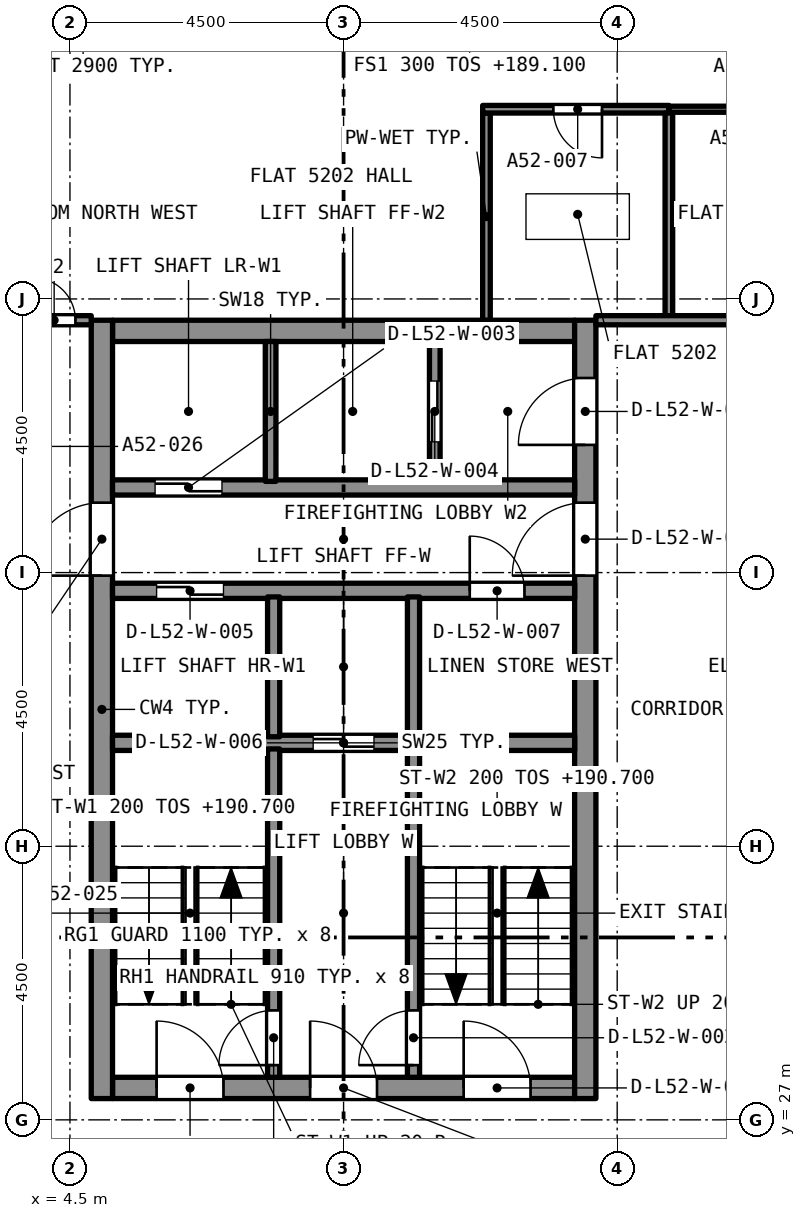
"""IFC4 building model, lengths in metres.
Left out: names, types, materials, properties, quantities, classifications, styles, units other than length and angle.
Written with IfcOpenShell. Run it as: python <this file> out.ifc"""

import sys

from ifc_helpers import new_model, si_unit, direction, frame, frame_2d, origin, place, context, subcontext, project, spatial, rectangle, extrude, element, fill, save


model = new_model("IFC4")
c1 = context("Model", 3, precision=1e-05, world=origin(), true_north=direction((0.0, 1.0)))
c2 = subcontext(c1, "Body", "Model", "MODEL_VIEW")
j1 = project(units=[si_unit("LENGTHUNIT", "METRE"), si_unit("PLANEANGLEUNIT", "RADIAN")], contexts=[c1])
p1 = place(None, origin())
s1 = spatial("IfcSite", under=j1, at=p1, CompositionType="ELEMENT")
p2 = place(p1, origin())
s2 = spatial("IfcBuilding", under=s1, at=p2, CompositionType="ELEMENT")
p3 = place(p2, frame((0.0, 0.0, 189.1)))
s3 = spatial("IfcBuildingStorey", under=s2, at=p3, CompositionType="ELEMENT", Elevation=189.1)
p4 = place(p3, frame((5.2, 27.525, 0.0), z_axis=(0.0, 0.0, 1.0), x_axis=(1.0, 0.0, 0.0)))
e1 = element("IfcWall", 1, at=p4, inside=s3, PredefinedType="SOLIDWALL", context=c2, shape_type="SweptSolid", body=[
    extrude(rectangle(XDim=7.6, YDim=0.35, at=frame_2d((3.8, 0.0))), origin(), (0.0, 0.0, 1.0), 3.2),
])
p5 = place(p4, frame((0.725, 0.0, 0.0)))
e2 = element("IfcOpeningElement", 2, at=p5, cuts=e1, PredefinedType="OPENING", context=c2, shape_type="SweptSolid", body=[
    extrude(rectangle(XDim=1.1, YDim=2.1, at=frame_2d((0.55, 1.05))), frame((0.0, 0.185, 0.0), z_axis=(0.0, -1.0, 0.0), x_axis=(1.0, 0.0, 0.0)), (0.0, 0.0, 1.0), 0.37),
])
p6 = place(p4, frame((3.25, 0.0, 0.0)))
e3 = element("IfcOpeningElement", 3, at=p6, cuts=e1, PredefinedType="OPENING", context=c2, shape_type="SweptSolid", body=[
    extrude(rectangle(XDim=1.1, YDim=2.1, at=frame_2d((0.55, 1.05))), frame((0.0, 0.185, 0.0), z_axis=(0.0, -1.0, 0.0), x_axis=(1.0, 0.0, 0.0)), (0.0, 0.0, 1.0), 0.37),
])
p7 = place(p4, frame((5.775, 0.0, 0.0)))
e4 = element("IfcOpeningElement", 4, at=p7, cuts=e1, PredefinedType="OPENING", context=c2, shape_type="SweptSolid", body=[
    extrude(rectangle(XDim=1.1, YDim=2.1, at=frame_2d((0.55, 1.05))), frame((0.0, 0.185, 0.0), z_axis=(0.0, -1.0, 0.0), x_axis=(1.0, 0.0, 0.0)), (0.0, 0.0, 1.0), 0.37),
])
p8 = place(p3, frame((5.2, 39.975, 0.0), z_axis=(0.0, 0.0, 1.0), x_axis=(1.0, 0.0, 0.0)))
e5 = element("IfcWall", 5, at=p8, inside=s3, PredefinedType="SOLIDWALL", context=c2, shape_type="SweptSolid", body=[
    extrude(rectangle(XDim=7.6, YDim=0.35, at=frame_2d((3.8, 0.0))), origin(), (0.0, 0.0, 1.0), 3.2),
])
p9 = place(p3, frame((5.025, 27.35, 0.0), z_axis=(0.0, 0.0, 1.0), x_axis=(0.0, 1.0, 0.0)))
e6 = element("IfcWall", 6, at=p9, inside=s3, PredefinedType="SOLIDWALL", context=c2, shape_type="SweptSolid", body=[
    extrude(rectangle(XDim=12.8, YDim=0.35, at=frame_2d((6.4, 0.0))), origin(), (0.0, 0.0, 1.0), 3.2),
])
p10 = place(p9, frame((8.6, 0.0, 0.0)))
e7 = element("IfcOpeningElement", 7, at=p10, cuts=e6, PredefinedType="OPENING", context=c2, shape_type="SweptSolid", body=[
    extrude(rectangle(XDim=1.2, YDim=2.1, at=frame_2d((0.6, 1.05))), frame((0.0, 0.185, 0.0), z_axis=(0.0, -1.0, 0.0), x_axis=(1.0, 0.0, 0.0)), (0.0, 0.0, 1.0), 0.37),
])
p11 = place(p3, frame((12.975, 27.35, 0.0), z_axis=(0.0, 0.0, 1.0), x_axis=(0.0, 1.0, 0.0)))
e8 = element("IfcWall", 8, at=p11, inside=s3, PredefinedType="SOLIDWALL", context=c2, shape_type="SweptSolid", body=[
    extrude(rectangle(XDim=12.8, YDim=0.35, at=frame_2d((6.4, 0.0))), origin(), (0.0, 0.0, 1.0), 3.2),
])
p12 = place(p11, frame((10.75, 0.0, 0.0)))
e9 = element("IfcOpeningElement", 9, at=p12, cuts=e8, PredefinedType="OPENING", context=c2, shape_type="SweptSolid", body=[
    extrude(rectangle(XDim=1.1, YDim=2.1, at=frame_2d((0.55, 1.05))), frame((0.0, 0.185, 0.0), z_axis=(0.0, -1.0, 0.0), x_axis=(1.0, 0.0, 0.0)), (0.0, 0.0, 1.0), 0.37),
])
p13 = place(p11, frame((8.6, 0.0, 0.0)))
e10 = element("IfcOpeningElement", 10, at=p13, cuts=e8, PredefinedType="OPENING", context=c2, shape_type="SweptSolid", body=[
    extrude(rectangle(XDim=1.2, YDim=2.1, at=frame_2d((0.6, 1.05))), frame((0.0, 0.185, 0.0), z_axis=(0.0, -1.0, 0.0), x_axis=(1.0, 0.0, 0.0)), (0.0, 0.0, 1.0), 0.37),
])
p14 = place(p3, frame((11.35, 40.15, 0.0), z_axis=(0.0, 0.0, 1.0), x_axis=(0.0, 1.0, 0.0)))
e11 = element("IfcWall", 11, at=p14, inside=s3, PredefinedType="PARTITIONING", context=c2, shape_type="SweptSolid", body=[
    extrude(rectangle(XDim=3.408, YDim=0.125, at=frame_2d((1.704, 0.0))), origin(), (0.0, 0.0, 1.0), 2.9),
])
p15 = place(p3, frame((14.35, 43.62, 0.0), z_axis=(0.0, 0.0, 1.0), x_axis=(-1.0, 0.0, 0.0)))
e12 = element("IfcWall", 12, at=p15, inside=s3, PredefinedType="PARTITIONING", context=c2, shape_type="SweptSolid", body=[
    extrude(rectangle(XDim=3.063, YDim=0.125, at=frame_2d((1.531, 0.0))), origin(), (0.0, 0.0, 1.0), 2.9),
])
p16 = place(p15, frame((1.1, 0.0, 0.0)))
e13 = element("IfcOpeningElement", 13, at=p16, cuts=e12, PredefinedType="OPENING", context=c2, shape_type="SweptSolid", body=[
    extrude(rectangle(XDim=0.8, YDim=2.1, at=frame_2d((0.4, 1.05))), frame((0.0, 0.073, 0.0), z_axis=(0.0, -1.0, 0.0), x_axis=(1.0, 0.0, 0.0)), (0.0, 0.0, 1.0), 0.145),
])
p17 = place(p3, frame((14.35, 40.225, 0.0), z_axis=(0.0, 0.0, 1.0), x_axis=(0.0, 1.0, 0.0)))
e14 = element("IfcWall", 14, at=p17, inside=s3, PredefinedType="PARTITIONING", context=c2, shape_type="SweptSolid", body=[
    extrude(rectangle(XDim=3.333, YDim=0.125, at=frame_2d((1.666, 0.0))), origin(), (0.0, 0.0, 1.0), 2.9),
])
p18 = place(p3, frame((13.15, 40.15, 0.0), z_axis=(0.0, 0.0, 1.0), x_axis=(1.0, 0.0, 0.0)))
e15 = element("IfcWall", 15, at=p18, inside=s3, PredefinedType="PARTITIONING", context=c2, shape_type="SweptSolid", body=[
    extrude(rectangle(XDim=4.45, YDim=0.15, at=frame_2d((2.225, 0.0))), origin(), (0.0, 0.0, 1.0), 2.9),
])
p19 = place(p3, frame((17.875, 43.62, 0.0), z_axis=(0.0, 0.0, 1.0), x_axis=(-1.0, 0.0, 0.0)))
e16 = element("IfcWall", 16, at=p19, inside=s3, PredefinedType="PARTITIONING", context=c2, shape_type="SweptSolid", body=[
    extrude(rectangle(XDim=3.525, YDim=0.1, at=frame_2d((1.762, 0.0))), origin(), (0.0, 0.0, 1.0), 2.9),
])
p20 = place(p19, frame((1.25, 0.0, 0.0)))
e17 = element("IfcOpeningElement", 17, at=p20, cuts=e16, PredefinedType="OPENING", context=c2, shape_type="SweptSolid", body=[
    extrude(rectangle(XDim=0.9, YDim=2.1, at=frame_2d((0.45, 1.05))), frame((0.0, 0.06, 0.0), z_axis=(0.0, -1.0, 0.0), x_axis=(1.0, 0.0, 0.0)), (0.0, 0.0, 1.0), 0.12),
])
p21 = place(p3, frame((3.65, 40.15, 0.0), z_axis=(0.0, 0.0, 1.0), x_axis=(1.0, 0.0, 0.0)))
e18 = element("IfcWall", 18, at=p21, inside=s3, PredefinedType="PARTITIONING", context=c2, shape_type="SweptSolid", body=[
    extrude(rectangle(XDim=1.2, YDim=0.15, at=frame_2d((0.6, 0.0))), origin(), (0.0, 0.0, 1.0), 2.9),
])
p22 = place(p21, frame((0.24, 0.0, 0.0)))
e19 = element("IfcOpeningElement", 19, at=p22, cuts=e18, PredefinedType="OPENING", context=c2, shape_type="SweptSolid", body=[
    extrude(rectangle(XDim=0.7, YDim=2.1, at=frame_2d((0.35, 1.05))), frame((0.0, 0.085, 0.0), z_axis=(0.0, -1.0, 0.0), x_axis=(1.0, 0.0, 0.0)), (0.0, 0.0, 1.0), 0.17),
])
p23 = place(p3, frame((5.2, 33.2, 0.0), z_axis=(0.0, 0.0, 1.0), x_axis=(1.0, 0.0, 0.0)))
e20 = element("IfcWall", 20, at=p23, inside=s3, PredefinedType="SOLIDWALL", context=c2, shape_type="SweptSolid", body=[
    extrude(rectangle(XDim=7.6, YDim=0.25, at=frame_2d((3.8, 0.0))), origin(), (0.0, 0.0, 1.0), 2.9),
])
p24 = place(p23, frame((3.3, 0.0, 0.0)))
e21 = element("IfcOpeningElement", 21, at=p24, cuts=e20, PredefinedType="OPENING", context=c2, shape_type="SweptSolid", body=[
    extrude(rectangle(XDim=1.0, YDim=2.1, at=frame_2d((0.5, 1.05))), frame((0.0, 0.135, 0.0), z_axis=(0.0, -1.0, 0.0), x_axis=(1.0, 0.0, 0.0)), (0.0, 0.0, 1.0), 0.27),
])
p25 = place(p3, frame((5.2, 35.7, 0.0), z_axis=(0.0, 0.0, 1.0), x_axis=(1.0, 0.0, 0.0)))
e22 = element("IfcWall", 22, at=p25, inside=s3, PredefinedType="SOLIDWALL", context=c2, shape_type="SweptSolid", body=[
    extrude(rectangle(XDim=7.6, YDim=0.25, at=frame_2d((3.8, 0.0))), origin(), (0.0, 0.0, 1.0), 2.9),
])
p26 = place(p25, frame((0.725, 0.0, 0.0)))
e23 = element("IfcOpeningElement", 23, at=p26, cuts=e22, PredefinedType="OPENING", context=c2, shape_type="SweptSolid", body=[
    extrude(rectangle(XDim=1.1, YDim=2.4, at=frame_2d((0.55, 1.2))), frame((0.0, 0.135, 0.0), z_axis=(0.0, -1.0, 0.0), x_axis=(1.0, 0.0, 0.0)), (0.0, 0.0, 1.0), 0.27),
])
p27 = place(p25, frame((5.875, 0.0, 0.0)))
e24 = element("IfcOpeningElement", 24, at=p27, cuts=e22, PredefinedType="OPENING", context=c2, shape_type="SweptSolid", body=[
    extrude(rectangle(XDim=0.9, YDim=2.1, at=frame_2d((0.45, 1.05))), frame((0.0, 0.135, 0.0), z_axis=(0.0, -1.0, 0.0), x_axis=(1.0, 0.0, 0.0)), (0.0, 0.0, 1.0), 0.27),
])
p28 = place(p3, frame((5.2, 37.4, 0.0), z_axis=(0.0, 0.0, 1.0), x_axis=(1.0, 0.0, 0.0)))
e25 = element("IfcWall", 25, at=p28, inside=s3, PredefinedType="SOLIDWALL", context=c2, shape_type="SweptSolid", body=[
    extrude(rectangle(XDim=7.6, YDim=0.25, at=frame_2d((3.8, 0.0))), origin(), (0.0, 0.0, 1.0), 2.9),
])
p29 = place(p28, frame((0.7, 0.0, 0.0)))
e26 = element("IfcOpeningElement", 26, at=p29, cuts=e25, PredefinedType="OPENING", context=c2, shape_type="SweptSolid", body=[
    extrude(rectangle(XDim=1.1, YDim=2.4, at=frame_2d((0.55, 1.2))), frame((0.0, 0.135, 0.0), z_axis=(0.0, -1.0, 0.0), x_axis=(1.0, 0.0, 0.0)), (0.0, 0.0, 1.0), 0.27),
])
p30 = place(p3, frame((7.85, 27.7, 0.0), z_axis=(0.0, 0.0, 1.0), x_axis=(0.0, 1.0, 0.0)))
e27 = element("IfcWall", 27, at=p30, inside=s3, PredefinedType="SOLIDWALL", context=c2, shape_type="SweptSolid", body=[
    extrude(rectangle(XDim=5.4, YDim=0.2, at=frame_2d((2.7, 0.0))), origin(), (0.0, 0.0, 1.0), 2.9),
])
p31 = place(p30, frame((0.2, 0.0, 0.0)))
e28 = element("IfcOpeningElement", 28, at=p31, cuts=e27, PredefinedType="OPENING", context=c2, shape_type="SweptSolid", body=[
    extrude(rectangle(XDim=0.9, YDim=2.1, at=frame_2d((0.45, 1.05))), frame((0.0, 0.11, 0.0), z_axis=(0.0, -1.0, 0.0), x_axis=(1.0, 0.0, 0.0)), (0.0, 0.0, 1.0), 0.22),
])
p32 = place(p3, frame((10.15, 27.7, 0.0), z_axis=(0.0, 0.0, 1.0), x_axis=(0.0, 1.0, 0.0)))
e29 = element("IfcWall", 29, at=p32, inside=s3, PredefinedType="SOLIDWALL", context=c2, shape_type="SweptSolid", body=[
    extrude(rectangle(XDim=5.4, YDim=0.2, at=frame_2d((2.7, 0.0))), origin(), (0.0, 0.0, 1.0), 2.9),
])
p33 = place(p32, frame((0.2, 0.0, 0.0)))
e30 = element("IfcOpeningElement", 30, at=p33, cuts=e29, PredefinedType="OPENING", context=c2, shape_type="SweptSolid", body=[
    extrude(rectangle(XDim=0.9, YDim=2.1, at=frame_2d((0.45, 1.05))), frame((0.0, 0.11, 0.0), z_axis=(0.0, -1.0, 0.0), x_axis=(1.0, 0.0, 0.0)), (0.0, 0.0, 1.0), 0.22),
])
for number, where, z_axis, x_axis in (
    (31, (7.85, 33.3, 0.0), (0.0, 0.0, 1.0), (0.0, 1.0, 0.0)),
    (32, (10.15, 33.3, 0.0), (0.0, 0.0, 1.0), (0.0, 1.0, 0.0)),
):
    element("IfcWall", number, at=place(p3, frame(where, z_axis=z_axis, x_axis=x_axis)), inside=s3, PredefinedType="SOLIDWALL", context=c2, shape_type="SweptSolid", body=[
        extrude(rectangle(XDim=2.3, YDim=0.2, at=frame_2d((1.15, 0.0))), origin(), (0.0, 0.0, 1.0), 2.9),
    ])
p34 = place(p3, frame((7.8, 37.5, 0.0), z_axis=(0.0, 0.0, 1.0), x_axis=(0.0, 1.0, 0.0)))
e33 = element("IfcWall", 33, at=p34, inside=s3, PredefinedType="SOLIDWALL", context=c2, shape_type="SweptSolid", body=[
    extrude(rectangle(XDim=2.3, YDim=0.175, at=frame_2d((1.15, 0.0))), origin(), (0.0, 0.0, 1.0), 2.9),
])
p35 = place(p3, frame((10.5, 37.5, 0.0), z_axis=(0.0, 0.0, 1.0), x_axis=(0.0, 1.0, 0.0)))
e34 = element("IfcWall", 34, at=p35, inside=s3, PredefinedType="SOLIDWALL", context=c2, shape_type="SweptSolid", body=[
    extrude(rectangle(XDim=2.3, YDim=0.175, at=frame_2d((1.15, 0.0))), origin(), (0.0, 0.0, 1.0), 2.9),
])
p36 = place(p35, frame((0.65, 0.0, 0.0)))
e35 = element("IfcOpeningElement", 35, at=p36, cuts=e34, PredefinedType="OPENING", context=c2, shape_type="SweptSolid", body=[
    extrude(rectangle(XDim=1.0, YDim=2.1, at=frame_2d((0.5, 1.05))), frame((0.0, 0.097, 0.0), z_axis=(0.0, -1.0, 0.0), x_axis=(1.0, 0.0, 0.0)), (0.0, 0.0, 1.0), 0.195),
])
p37 = place(p16, origin())
e36 = element("IfcDoor", 36, at=p37, inside=s3, OperationType="SINGLE_SWING_LEFT", PredefinedType="DOOR", context=c2, shape_type="SweptSolid", body=[
    extrude(rectangle(XDim=0.8, YDim=2.1, at=frame_2d((0.4, 1.05))), frame((0.0, 0.025, 0.0), z_axis=(0.0, -1.0, 0.0), x_axis=(1.0, 0.0, 0.0)), (0.0, 0.0, 1.0), 0.05),
])
fill(e13, e36)
p38 = place(p22, origin())
e37 = element("IfcDoor", 37, at=p38, inside=s3, OperationType="SINGLE_SWING_LEFT", PredefinedType="DOOR", context=c2, shape_type="SweptSolid", body=[
    extrude(rectangle(XDim=0.7, YDim=2.1, at=frame_2d((0.35, 1.05))), frame((0.0, 0.025, 0.0), z_axis=(0.0, -1.0, 0.0), x_axis=(1.0, 0.0, 0.0)), (0.0, 0.0, 1.0), 0.05),
])
fill(e19, e37)
p39 = place(p31, origin())
e38 = element("IfcDoor", 38, at=p39, inside=s3, OperationType="SINGLE_SWING_LEFT", PredefinedType="DOOR", context=c2, shape_type="SweptSolid", body=[
    extrude(rectangle(XDim=0.9, YDim=2.1, at=frame_2d((0.45, 1.05))), frame((0.0, 0.025, 0.0), z_axis=(0.0, -1.0, 0.0), x_axis=(1.0, 0.0, 0.0)), (0.0, 0.0, 1.0), 0.05),
])
fill(e28, e38)
p40 = place(p33, origin())
e39 = element("IfcDoor", 39, at=p40, inside=s3, OperationType="SINGLE_SWING_LEFT", PredefinedType="DOOR", context=c2, shape_type="SweptSolid", body=[
    extrude(rectangle(XDim=0.9, YDim=2.1, at=frame_2d((0.45, 1.05))), frame((0.0, 0.025, 0.0), z_axis=(0.0, -1.0, 0.0), x_axis=(1.0, 0.0, 0.0)), (0.0, 0.0, 1.0), 0.05),
])
fill(e30, e39)
p41 = place(p29, origin())
e40 = element("IfcDoor", 40, at=p41, inside=s3, OperationType="SLIDING_TO_LEFT", PredefinedType="DOOR", context=c2, shape_type="SweptSolid", body=[
    extrude(rectangle(XDim=1.1, YDim=2.4, at=frame_2d((0.55, 1.2))), frame((0.0, 0.025, 0.0), z_axis=(0.0, -1.0, 0.0), x_axis=(1.0, 0.0, 0.0)), (0.0, 0.0, 1.0), 0.05),
])
fill(e26, e40)
p42 = place(p36, origin())
e41 = element("IfcDoor", 41, at=p42, inside=s3, OperationType="SLIDING_TO_LEFT", PredefinedType="DOOR", context=c2, shape_type="SweptSolid", body=[
    extrude(rectangle(XDim=1.0, YDim=2.1, at=frame_2d((0.5, 1.05))), frame((0.0, 0.025, 0.0), z_axis=(0.0, -1.0, 0.0), x_axis=(1.0, 0.0, 0.0)), (0.0, 0.0, 1.0), 0.05),
])
fill(e35, e41)
p43 = place(p26, origin())
e42 = element("IfcDoor", 42, at=p43, inside=s3, OperationType="SLIDING_TO_LEFT", PredefinedType="DOOR", context=c2, shape_type="SweptSolid", body=[
    extrude(rectangle(XDim=1.1, YDim=2.4, at=frame_2d((0.55, 1.2))), frame((0.0, 0.025, 0.0), z_axis=(0.0, -1.0, 0.0), x_axis=(1.0, 0.0, 0.0)), (0.0, 0.0, 1.0), 0.05),
])
fill(e23, e42)
p44 = place(p24, origin())
e43 = element("IfcDoor", 43, at=p44, inside=s3, OperationType="SLIDING_TO_LEFT", PredefinedType="DOOR", context=c2, shape_type="SweptSolid", body=[
    extrude(rectangle(XDim=1.0, YDim=2.1, at=frame_2d((0.5, 1.05))), frame((0.0, 0.025, 0.0), z_axis=(0.0, -1.0, 0.0), x_axis=(1.0, 0.0, 0.0)), (0.0, 0.0, 1.0), 0.05),
])
fill(e21, e43)
p45 = place(p27, origin())
e44 = element("IfcDoor", 44, at=p45, inside=s3, OperationType="SINGLE_SWING_LEFT", PredefinedType="DOOR", context=c2, shape_type="SweptSolid", body=[
    extrude(rectangle(XDim=0.9, YDim=2.1, at=frame_2d((0.45, 1.05))), frame((0.0, 0.025, 0.0), z_axis=(0.0, -1.0, 0.0), x_axis=(1.0, 0.0, 0.0)), (0.0, 0.0, 1.0), 0.05),
])
fill(e24, e44)
p46 = place(p5, origin())
e45 = element("IfcDoor", 45, at=p46, inside=s3, OperationType="SINGLE_SWING_LEFT", PredefinedType="DOOR", context=c2, shape_type="SweptSolid", body=[
    extrude(rectangle(XDim=1.1, YDim=2.1, at=frame_2d((0.55, 1.05))), frame((0.0, 0.025, 0.0), z_axis=(0.0, -1.0, 0.0), x_axis=(1.0, 0.0, 0.0)), (0.0, 0.0, 1.0), 0.05),
])
fill(e2, e45)
p47 = place(p6, origin())
e46 = element("IfcDoor", 46, at=p47, inside=s3, OperationType="SINGLE_SWING_LEFT", PredefinedType="DOOR", context=c2, shape_type="SweptSolid", body=[
    extrude(rectangle(XDim=1.1, YDim=2.1, at=frame_2d((0.55, 1.05))), frame((0.0, 0.025, 0.0), z_axis=(0.0, -1.0, 0.0), x_axis=(1.0, 0.0, 0.0)), (0.0, 0.0, 1.0), 0.05),
])
fill(e3, e46)
p48 = place(p7, origin())
e47 = element("IfcDoor", 47, at=p48, inside=s3, OperationType="SINGLE_SWING_LEFT", PredefinedType="DOOR", context=c2, shape_type="SweptSolid", body=[
    extrude(rectangle(XDim=1.1, YDim=2.1, at=frame_2d((0.55, 1.05))), frame((0.0, 0.025, 0.0), z_axis=(0.0, -1.0, 0.0), x_axis=(1.0, 0.0, 0.0)), (0.0, 0.0, 1.0), 0.05),
])
fill(e4, e47)
p49 = place(p12, origin())
e48 = element("IfcDoor", 48, at=p49, inside=s3, OperationType="SINGLE_SWING_LEFT", PredefinedType="DOOR", context=c2, shape_type="SweptSolid", body=[
    extrude(rectangle(XDim=1.1, YDim=2.1, at=frame_2d((0.55, 1.05))), frame((0.0, 0.025, 0.0), z_axis=(0.0, -1.0, 0.0), x_axis=(1.0, 0.0, 0.0)), (0.0, 0.0, 1.0), 0.05),
])
fill(e9, e48)
p50 = place(p10, origin())
e49 = element("IfcDoor", 49, at=p50, inside=s3, OperationType="SINGLE_SWING_LEFT", PredefinedType="DOOR", context=c2, shape_type="SweptSolid", body=[
    extrude(rectangle(XDim=1.2, YDim=2.1, at=frame_2d((0.6, 1.05))), frame((0.0, 0.025, 0.0), z_axis=(0.0, -1.0, 0.0), x_axis=(1.0, 0.0, 0.0)), (0.0, 0.0, 1.0), 0.05),
])
fill(e7, e49)
p51 = place(p13, origin())
e50 = element("IfcDoor", 50, at=p51, inside=s3, OperationType="SINGLE_SWING_LEFT", PredefinedType="DOOR", context=c2, shape_type="SweptSolid", body=[
    extrude(rectangle(XDim=1.2, YDim=2.1, at=frame_2d((0.6, 1.05))), frame((0.0, 0.025, 0.0), z_axis=(0.0, -1.0, 0.0), x_axis=(1.0, 0.0, 0.0)), (0.0, 0.0, 1.0), 0.05),
])
fill(e10, e50)
save(model, sys.argv[1])
